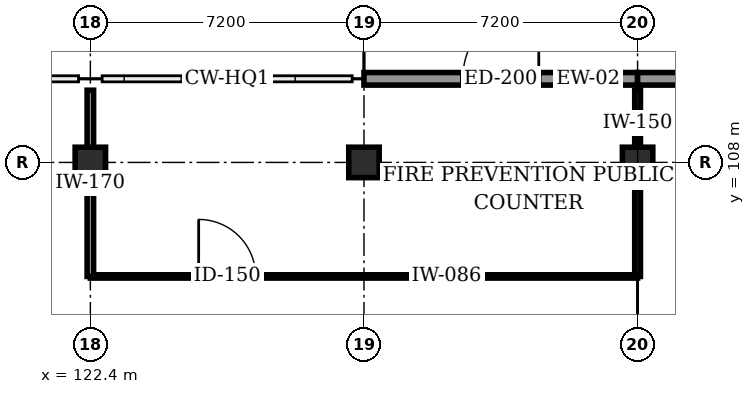
"""IFC4 building model, lengths in metres.
Left out: names, types, materials, properties, quantities, classifications, styles, units other than length and angle.
Written with IfcOpenShell. Run it as: python <this file> out.ifc"""

import sys

from ifc_helpers import new_model, si_unit, direction, frame, frame_2d, origin, origin_2d, place, context, subcontext, project, spatial, rectangle, extrude, element, fill, save


model = new_model("IFC4")
c1 = context("Model", 3, precision=1e-05, world=origin(), true_north=direction((0.0, 1.0)))
c2 = subcontext(c1, "Body", "Model", "MODEL_VIEW")
j1 = project(units=[si_unit("LENGTHUNIT", "METRE"), si_unit("PLANEANGLEUNIT", "RADIAN")], contexts=[c1])
p1 = place(None, origin())
s1 = spatial("IfcSite", under=j1, at=p1, CompositionType="ELEMENT")
p2 = place(p1, origin())
s2 = spatial("IfcBuilding", under=s1, at=p2, CompositionType="ELEMENT")
p3 = place(p2, origin())
s3 = spatial("IfcBuildingStorey", under=s2, at=p3, CompositionType="ELEMENT", Elevation=0.0)
for number, where, z_axis, x_axis in (
    (1, (122.4, 108.0, 0.0), (0.0, 0.0, 1.0), (1.0, 0.0, 0.0)),
    (2, (129.6, 108.0, 0.0), (0.0, 0.0, 1.0), (1.0, 0.0, 0.0)),
    (3, (136.8, 108.0, 0.0), (0.0, 0.0, 1.0), (1.0, 0.0, 0.0)),
):
    element("IfcColumn", number, at=place(p3, frame(where, z_axis=z_axis, x_axis=x_axis)), inside=s3, PredefinedType="COLUMN", context=c2, shape_type="SweptSolid", body=[
        extrude(rectangle(XDim=0.8, YDim=0.8, at=origin_2d()), origin(), (0.0, 0.0, 1.0), 6.0),
    ])
p4 = place(p3, frame((129.6, 110.2, 0.0), z_axis=(0.0, 0.0, 1.0), x_axis=(1.0, 0.0, 0.0)))
e4 = element("IfcWall", 4, at=p4, inside=s3, PredefinedType="STANDARD", context=c2, shape_type="SweptSolid", body=[
    extrude(rectangle(XDim=7.2, YDim=0.33, at=frame_2d((3.6, 0.0))), origin(), (0.0, 0.0, 1.0), 5.05),
])
p5 = place(p4, frame((2.6, 0.0, 0.0)))
e5 = element("IfcOpeningElement", 5, at=p5, cuts=e4, PredefinedType="OPENING", context=c2, shape_type="SweptSolid", body=[
    extrude(rectangle(XDim=2.0, YDim=2.4, at=frame_2d((1.0, 1.2))), frame((0.0, 0.175, 0.0), z_axis=(0.0, -1.0, 0.0), x_axis=(1.0, 0.0, 0.0)), (0.0, 0.0, 1.0), 0.35),
])
p6 = place(p3, frame((136.8, 110.2, 0.0), z_axis=(0.0, 0.0, 1.0), x_axis=(1.0, 0.0, 0.0)))
e6 = element("IfcWall", 6, at=p6, inside=s3, PredefinedType="STANDARD", context=c2, shape_type="SweptSolid", body=[
    extrude(rectangle(XDim=7.2, YDim=0.33, at=frame_2d((3.6, 0.0))), origin(), (0.0, 0.0, 1.0), 5.05),
])
p7 = place(p6, frame((2.63, 0.0, 0.0)))
e7 = element("IfcOpeningElement", 7, at=p7, cuts=e6, PredefinedType="OPENING", context=c2, shape_type="SweptSolid", body=[
    extrude(rectangle(XDim=1.94, YDim=2.38, at=frame_2d((0.97, 1.19))), frame((0.0, 0.175, 0.0), z_axis=(0.0, -1.0, 0.0), x_axis=(1.0, 0.0, 0.0)), (0.0, 0.0, 1.0), 0.35),
])
p8 = place(p3, frame((122.4, 105.0, 0.0), z_axis=(0.0, 0.0, 1.0), x_axis=(1.0, 0.0, 0.0)))
e8 = element("IfcWall", 8, at=p8, inside=s3, PredefinedType="STANDARD", context=c2, shape_type="SweptSolid", body=[
    extrude(rectangle(XDim=14.4, YDim=0.086, at=frame_2d((7.2, 0.0))), origin(), (0.0, 0.0, 1.0), 5.103),
])
p9 = place(p8, frame((2.85, 0.0, 0.0)))
e9 = element("IfcOpeningElement", 9, at=p9, cuts=e8, PredefinedType="OPENING", context=c2, shape_type="SweptSolid", body=[
    extrude(rectangle(XDim=1.5, YDim=2.26, at=frame_2d((0.75, 1.13))), frame((0.0, 0.053, 0.0), z_axis=(0.0, -1.0, 0.0), x_axis=(1.0, 0.0, 0.0)), (0.0, 0.0, 1.0), 0.106),
])
p10 = place(p3, frame((122.4, 109.9, 0.0), z_axis=(0.0, 0.0, 1.0), x_axis=(0.0, -1.0, 0.0)))
e10 = element("IfcWall", 10, at=p10, inside=s3, PredefinedType="STANDARD", context=c2, shape_type="SweptSolid", body=[
    extrude(rectangle(XDim=4.9, YDim=0.17, at=frame_2d((2.45, 0.0))), origin(), (0.0, 0.0, 1.0), 5.022),
])
p11 = place(p3, frame((136.8, 105.0, 0.0), z_axis=(0.0, 0.0, 1.0), x_axis=(0.0, 1.0, 0.0)))
e11 = element("IfcWall", 11, at=p11, inside=s3, PredefinedType="STANDARD", context=c2, shape_type="SweptSolid", body=[
    extrude(rectangle(XDim=4.9, YDim=0.15, at=frame_2d((2.45, 0.0))), origin(), (0.0, 0.0, 1.0), 5.022),
])
p12 = place(p5, origin())
e12 = element("IfcDoor", 12, at=p12, inside=s3, OperationType="SINGLE_SWING_RIGHT", PredefinedType="DOOR", context=c2, shape_type="SweptSolid", body=[
    extrude(rectangle(XDim=2.0, YDim=2.4, at=frame_2d((1.0, 1.2))), frame((0.0, 0.025, 0.0), z_axis=(0.0, -1.0, 0.0), x_axis=(1.0, 0.0, 0.0)), (0.0, 0.0, 1.0), 0.05),
])
fill(e5, e12)
p13 = place(p9, origin())
e13 = element("IfcDoor", 13, at=p13, inside=s3, OperationType="SINGLE_SWING_LEFT", PredefinedType="DOOR", context=c2, shape_type="SweptSolid", body=[
    extrude(rectangle(XDim=1.5, YDim=2.26, at=frame_2d((0.75, 1.13))), frame((0.0, 0.025, 0.0), z_axis=(0.0, -1.0, 0.0), x_axis=(1.0, 0.0, 0.0)), (0.0, 0.0, 1.0), 0.05),
])
fill(e9, e13)
save(model, sys.argv[1])
